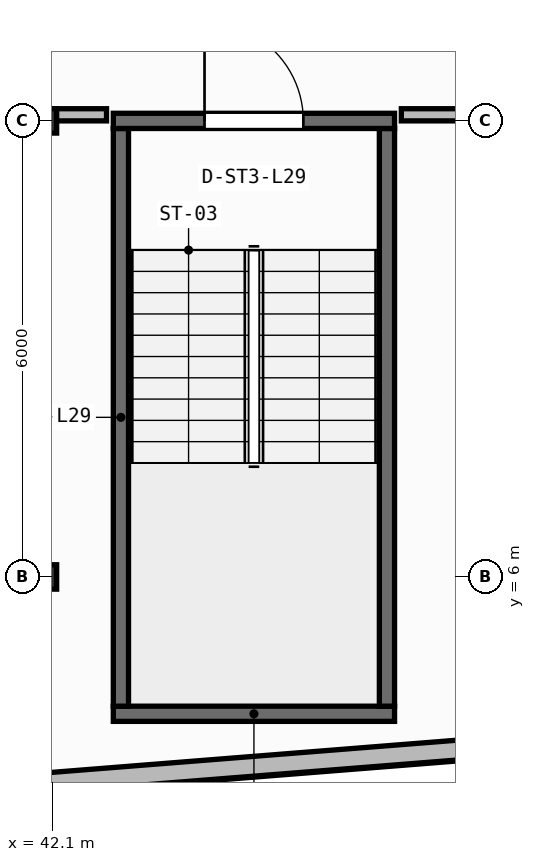
"""IFC4 building model, lengths in metres.
Left out: names, types, materials, properties, quantities, classifications, styles, units other than length and angle.
Written with IfcOpenShell. Run it as: python <this file> out.ifc"""

import sys

from ifc_helpers import new_model, si_unit, direction, frame, frame_2d, origin, origin_2d, place, context, subcontext, project, spatial, rectangle, i_section, extrude, element, fill, save


model = new_model("IFC4")
c1 = context("Model", 3, precision=1e-05, world=origin(), true_north=direction((0.0, 1.0)))
c2 = subcontext(c1, "Body", "Model", "MODEL_VIEW")
j1 = project(units=[si_unit("LENGTHUNIT", "METRE"), si_unit("PLANEANGLEUNIT", "RADIAN")], contexts=[c1])
p1 = place(None, origin())
s1 = spatial("IfcSite", under=j1, at=p1, CompositionType="ELEMENT")
p2 = place(p1, origin())
s2 = spatial("IfcBuilding", under=s1, at=p2, CompositionType="ELEMENT")
p3 = place(p2, frame((0.0, 0.0, 119.15)))
s3 = spatial("IfcBuildingStorey", under=s2, at=p3, CompositionType="ELEMENT", Elevation=119.15)
for number, where, z_axis, x_axis in (
    (1, (42.0, 6.0, 0.0), (0.0, 0.0, 1.0), (1.0, 0.0, 0.0)),
    (2, (42.0, 12.0, 0.0), (0.0, 0.0, 1.0), (1.0, 0.0, 0.0)),
):
    element("IfcColumn", number, at=place(p3, frame(where, z_axis=z_axis, x_axis=x_axis)), inside=s3, PredefinedType="COLUMN", context=c2, shape_type="SweptSolid", body=[
        extrude(i_section(OverallWidth=0.309, OverallDepth=0.321, WebThickness=0.014, FlangeThickness=0.022, FilletRadius=0.017, at=origin_2d()), origin(), (0.0, 0.0, 1.0), 3.95),
    ])
p4 = place(p3, frame((2.76, 0.173, 0.0), z_axis=(0.0, 0.0, 1.0), x_axis=(0.996857931723, 0.079210251617, 0.0)))
e3 = element("IfcWall", 3, at=p4, inside=s3, PredefinedType="STANDARD", context=c2, shape_type="SweptSolid", body=[
    extrude(rectangle(XDim=51.442, YDim=0.26, at=frame_2d((25.721, 0.0))), origin(), (0.0, 0.0, 1.0), 3.71),
])
p5 = place(p4, frame((24.521, 0.0, 0.9)))
e4 = element("IfcOpeningElement", 4, at=p5, cuts=e3, PredefinedType="OPENING", context=c2, shape_type="SweptSolid", body=[
    extrude(rectangle(XDim=2.4, YDim=1.65, at=frame_2d((1.2, 0.825))), frame((0.0, 0.14, 0.0), z_axis=(0.0, -1.0, 0.0), x_axis=(1.0, 0.0, 0.0)), (0.0, 0.0, 1.0), 0.28),
])
p6 = place(p3, frame((42.9, 4.2, 0.0), z_axis=(0.0, 0.0, 1.0), x_axis=(1.0, 0.0, 0.0)))
e5 = element("IfcWall", 5, at=p6, inside=s3, PredefinedType="SHEAR", context=c2, shape_type="SweptSolid", body=[
    extrude(rectangle(XDim=3.7, YDim=0.2, at=frame_2d((1.85, 0.0))), origin(), (0.0, 0.0, 1.0), 3.71),
])
for number, where, z_axis, x_axis in (
    (6, (43.0, 4.3, 0.0), (0.0, 0.0, 1.0), (0.0, 1.0, 0.0)),
    (7, (46.5, 4.3, 0.0), (0.0, 0.0, 1.0), (0.0, 1.0, 0.0)),
):
    element("IfcWall", number, at=place(p3, frame(where, z_axis=z_axis, x_axis=x_axis)), inside=s3, PredefinedType="SHEAR", context=c2, shape_type="SweptSolid", body=[
        extrude(rectangle(XDim=7.6, YDim=0.2, at=frame_2d((3.8, 0.0))), origin(), (0.0, 0.0, 1.0), 3.71),
    ])
p7 = place(p3, frame((42.9, 12.0, 0.0), z_axis=(0.0, 0.0, 1.0), x_axis=(1.0, 0.0, 0.0)))
e8 = element("IfcWall", 8, at=p7, inside=s3, PredefinedType="SHEAR", context=c2, shape_type="SweptSolid", body=[
    extrude(rectangle(XDim=3.7, YDim=0.2, at=frame_2d((1.85, 0.0))), origin(), (0.0, 0.0, 1.0), 3.71),
])
p8 = place(p7, frame((1.2, 0.0, 0.0)))
e9 = element("IfcOpeningElement", 9, at=p8, cuts=e8, PredefinedType="OPENING", context=c2, shape_type="SweptSolid", body=[
    extrude(rectangle(XDim=1.3, YDim=2.15, at=frame_2d((0.65, 1.075))), frame((0.0, 0.11, 0.0), z_axis=(0.0, -1.0, 0.0), x_axis=(1.0, 0.0, 0.0)), (0.0, 0.0, 1.0), 0.22),
])
p9 = place(p3, frame((40.03, 12.08, 0.0), z_axis=(0.0, 0.0, 1.0), x_axis=(1.0, 0.0, 0.0)))
e10 = element("IfcWall", 10, at=p9, inside=s3, PredefinedType="PARTITIONING", context=c2, shape_type="SweptSolid", body=[
    extrude(rectangle(XDim=2.781, YDim=0.16, at=frame_2d((1.39, 0.0))), origin(), (0.0, 0.0, 1.0), 3.083),
])
p10 = place(p3, frame((46.689, 12.08, 0.0), z_axis=(0.0, 0.0, 1.0), x_axis=(1.0, 0.0, 0.0)))
e11 = element("IfcWall", 11, at=p10, inside=s3, PredefinedType="PARTITIONING", context=c2, shape_type="SweptSolid", body=[
    extrude(rectangle(XDim=3.011, YDim=0.16, at=frame_2d((1.505, 0.0))), origin(), (0.0, 0.0, 1.0), 3.083),
])
p11 = place(p8, origin())
e12 = element("IfcDoor", 12, at=p11, inside=s3, OperationType="SINGLE_SWING_LEFT", PredefinedType="DOOR", context=c2, shape_type="SweptSolid", body=[
    extrude(rectangle(XDim=1.3, YDim=2.15, at=frame_2d((0.65, 1.075))), frame((0.0, 0.025, 0.0), z_axis=(0.0, -1.0, 0.0), x_axis=(1.0, 0.0, 0.0)), (0.0, 0.0, 1.0), 0.05),
])
fill(e9, e12)
save(model, sys.argv[1])
